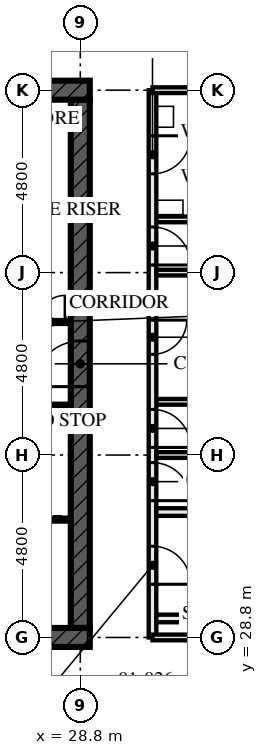
"""IFC4 building model, lengths in metres.
Left out: names, types, materials, properties, quantities, classifications, styles, units other than length and angle.
Written with IfcOpenShell. Run it as: python <this file> out.ifc"""

import sys

from ifc_helpers import new_model, si_unit, direction, frame, frame_2d, origin, place, context, subcontext, project, spatial, rectangle, extrude, element, fill, save


model = new_model("IFC4")
c1 = context("Model", 3, precision=1e-05, world=origin(), true_north=direction((0.0, 1.0)))
c2 = subcontext(c1, "Body", "Model", "MODEL_VIEW")
j1 = project(units=[si_unit("LENGTHUNIT", "METRE"), si_unit("PLANEANGLEUNIT", "RADIAN")], contexts=[c1])
p1 = place(None, origin())
s1 = spatial("IfcSite", under=j1, at=p1, CompositionType="ELEMENT")
p2 = place(p1, origin())
s2 = spatial("IfcBuilding", under=s1, at=p2, CompositionType="ELEMENT")
p3 = place(p2, frame((0.0, 0.0, 4.5)))
s3 = spatial("IfcBuildingStorey", under=s2, at=p3, CompositionType="ELEMENT", Elevation=4.5)
p4 = place(p3, frame((14.15, 28.8, -0.17), z_axis=(0.0, 0.0, 1.0), x_axis=(1.0, 0.0, 0.0)))
e1 = element("IfcWall", 1, at=p4, inside=s3, PredefinedType="SHEAR", context=c2, shape_type="SweptSolid", body=[
    extrude(rectangle(XDim=14.9, YDim=0.5, at=frame_2d((7.45, 0.0))), origin(), (0.0, 0.0, 1.0), 4.5),
])
p5 = place(p4, frame((6.85, 0.0, 0.17)))
e2 = element("IfcOpeningElement", 2, at=p5, cuts=e1, PredefinedType="OPENING", context=c2, shape_type="SweptSolid", body=[
    extrude(rectangle(XDim=1.2, YDim=2.1, at=frame_2d((0.6, 1.05))), frame((0.0, 0.26, 0.0), z_axis=(0.0, -1.0, 0.0), x_axis=(1.0, 0.0, 0.0)), (0.0, 0.0, 1.0), 0.521),
])
p6 = place(p3, frame((29.05, 43.2, -0.17), z_axis=(0.0, 0.0, 1.0), x_axis=(-1.0, 0.0, 0.0)))
e3 = element("IfcWall", 3, at=p6, inside=s3, PredefinedType="SHEAR", context=c2, shape_type="SweptSolid", body=[
    extrude(rectangle(XDim=14.9, YDim=0.5, at=frame_2d((7.45, 0.0))), origin(), (0.0, 0.0, 1.0), 4.5),
])
p7 = place(p6, frame((6.85, 0.0, 0.17)))
e4 = element("IfcOpeningElement", 4, at=p7, cuts=e3, PredefinedType="OPENING", context=c2, shape_type="SweptSolid", body=[
    extrude(rectangle(XDim=1.2, YDim=2.1, at=frame_2d((0.6, 1.05))), frame((0.0, 0.26, 0.0), z_axis=(0.0, -1.0, 0.0), x_axis=(1.0, 0.0, 0.0)), (0.0, 0.0, 1.0), 0.521),
])
p8 = place(p3, frame((28.8, 29.05, -0.17), z_axis=(0.0, 0.0, 1.0), x_axis=(0.0, 1.0, 0.0)))
e5 = element("IfcWall", 5, at=p8, inside=s3, PredefinedType="SHEAR", context=c2, shape_type="SweptSolid", body=[
    extrude(rectangle(XDim=13.9, YDim=0.5, at=frame_2d((6.95, 0.0))), origin(), (0.0, 0.0, 1.0), 4.5),
])
p9 = place(p8, frame((6.35, 0.0, 0.17)))
e6 = element("IfcOpeningElement", 6, at=p9, cuts=e5, PredefinedType="OPENING", context=c2, shape_type="SweptSolid", body=[
    extrude(rectangle(XDim=1.2, YDim=2.1, at=frame_2d((0.6, 1.05))), frame((0.0, 0.26, 0.0), z_axis=(0.0, -1.0, 0.0), x_axis=(1.0, 0.0, 0.0)), (0.0, 0.0, 1.0), 0.521),
])
for number, where, z_axis, x_axis in (
    (7, (35.5, 29.3, 0.0), (0.0, 0.0, 1.0), (-1.0, 0.0, 0.0)),
    (8, (35.5, 32.1, 0.0), (0.0, 0.0, 1.0), (-1.0, 0.0, 0.0)),
):
    element("IfcWall", number, at=place(p3, frame(where, z_axis=z_axis, x_axis=x_axis)), inside=s3, PredefinedType="SOLIDWALL", context=c2, shape_type="SweptSolid", body=[
        extrude(rectangle(XDim=4.7, YDim=0.2, at=frame_2d((2.35, 0.0))), origin(), (0.0, 0.0, 1.0), 3.99),
    ])
for number, where, z_axis, x_axis in (
    (9, (33.1, 35.0, 0.0), (0.0, 0.0, 1.0), (-1.0, 0.0, 0.0)),
    (10, (33.1, 39.8, 0.0), (0.0, 0.0, 1.0), (-1.0, 0.0, 0.0)),
):
    element("IfcWall", number, at=place(p3, frame(where, z_axis=z_axis, x_axis=x_axis)), inside=s3, PredefinedType="PARTITIONING", context=c2, shape_type="SweptSolid", body=[
        extrude(rectangle(XDim=2.3, YDim=0.15, at=frame_2d((1.15, 0.0))), origin(), (0.0, 0.0, 1.0), 4.33),
    ])
for number, where, z_axis, x_axis in (
    (11, (42.805, 33.6, 0.0), (0.0, 0.0, 1.0), (-1.0, 0.0, 0.0)),
    (12, (42.805, 38.4, 0.0), (0.0, 0.0, 1.0), (-1.0, 0.0, 0.0)),
):
    element("IfcWall", number, at=place(p3, frame(where, z_axis=z_axis, x_axis=x_axis)), inside=s3, PredefinedType="PARTITIONING", context=c2, shape_type="SweptSolid", body=[
        extrude(rectangle(XDim=12.005, YDim=0.15, at=frame_2d((6.002, 0.0))), origin(), (0.0, 0.0, 1.0), 3.55),
    ])
p10 = place(p3, frame((30.7, 28.8, 0.0), z_axis=(0.0, 0.0, 1.0), x_axis=(0.0, 1.0, 0.0)))
e13 = element("IfcWall", 13, at=p10, inside=s3, PredefinedType="PARTITIONING", context=c2, shape_type="SweptSolid", body=[
    extrude(rectangle(XDim=14.4, YDim=0.2, at=frame_2d((7.2, 0.0))), origin(), (0.0, 0.0, 1.0), 3.55),
])
p11 = place(p10, frame((1.4, 0.0, 0.0)))
e14 = element("IfcOpeningElement", 14, at=p11, cuts=e13, PredefinedType="OPENING", context=c2, shape_type="SweptSolid", body=[
    extrude(rectangle(XDim=1.0, YDim=2.1, at=frame_2d((0.5, 1.05))), frame((0.0, 0.111, 0.0), z_axis=(0.0, -1.0, 0.0), x_axis=(1.0, 0.0, 0.0)), (0.0, 0.0, 1.0), 0.221),
])
p12 = place(p10, frame((3.6, 0.0, 0.0)))
e15 = element("IfcOpeningElement", 15, at=p12, cuts=e13, PredefinedType="OPENING", context=c2, shape_type="SweptSolid", body=[
    extrude(rectangle(XDim=1.0, YDim=2.4, at=frame_2d((0.5, 1.2))), frame((0.0, 0.111, 0.0), z_axis=(0.0, -1.0, 0.0), x_axis=(1.0, 0.0, 0.0)), (0.0, 0.0, 1.0), 0.221),
])
p13 = place(p10, frame((5.0, 0.0, 0.0)))
e16 = element("IfcOpeningElement", 16, at=p13, cuts=e13, PredefinedType="OPENING", context=c2, shape_type="SweptSolid", body=[
    extrude(rectangle(XDim=1.0, YDim=2.4, at=frame_2d((0.5, 1.2))), frame((0.0, 0.111, 0.0), z_axis=(0.0, -1.0, 0.0), x_axis=(1.0, 0.0, 0.0)), (0.0, 0.0, 1.0), 0.221),
])
p14 = place(p10, frame((9.8, 0.0, 0.0)))
e17 = element("IfcOpeningElement", 17, at=p14, cuts=e13, PredefinedType="OPENING", context=c2, shape_type="SweptSolid", body=[
    extrude(rectangle(XDim=1.0, YDim=2.4, at=frame_2d((0.5, 1.2))), frame((0.0, 0.111, 0.0), z_axis=(0.0, -1.0, 0.0), x_axis=(1.0, 0.0, 0.0)), (0.0, 0.0, 1.0), 0.221),
])
p15 = place(p10, frame((7.45, 0.0, 0.0)))
e18 = element("IfcOpeningElement", 18, at=p15, cuts=e13, PredefinedType="OPENING", context=c2, shape_type="SweptSolid", body=[
    extrude(rectangle(XDim=0.9, YDim=2.1, at=frame_2d((0.45, 1.05))), frame((0.0, 0.111, 0.0), z_axis=(0.0, -1.0, 0.0), x_axis=(1.0, 0.0, 0.0)), (0.0, 0.0, 1.0), 0.221),
])
p16 = place(p10, frame((12.2, 0.0, 0.0)))
e19 = element("IfcOpeningElement", 19, at=p16, cuts=e13, PredefinedType="OPENING", context=c2, shape_type="SweptSolid", body=[
    extrude(rectangle(XDim=1.0, YDim=2.1, at=frame_2d((0.5, 1.05))), frame((0.0, 0.111, 0.0), z_axis=(0.0, -1.0, 0.0), x_axis=(1.0, 0.0, 0.0)), (0.0, 0.0, 1.0), 0.221),
])
p17 = place(p3, frame((23.05, 34.9, 0.0), z_axis=(0.0, 0.0, 1.0), x_axis=(1.0, 0.0, 0.0)))
e20 = element("IfcWall", 20, at=p17, inside=s3, PredefinedType="SOLIDWALL", context=c2, shape_type="SweptSolid", body=[
    extrude(rectangle(XDim=5.5, YDim=0.1, at=frame_2d((2.75, 0.0))), origin(), (0.0, 0.0, 1.0), 4.33),
])
p18 = place(p3, frame((22.65, 37.1, 0.0), z_axis=(0.0, 0.0, 1.0), x_axis=(1.0, 0.0, 0.0)))
e21 = element("IfcWall", 21, at=p18, inside=s3, PredefinedType="SOLIDWALL", context=c2, shape_type="SweptSolid", body=[
    extrude(rectangle(XDim=5.9, YDim=0.1, at=frame_2d((2.95, 0.0))), origin(), (0.0, 0.0, 1.0), 4.33),
])
p19 = place(p18, frame((3.5, 0.0, 0.0)))
e22 = element("IfcOpeningElement", 22, at=p19, cuts=e21, PredefinedType="OPENING", context=c2, shape_type="SweptSolid", body=[
    extrude(rectangle(XDim=0.9, YDim=2.1, at=frame_2d((0.45, 1.05))), frame((0.0, 0.061, 0.0), z_axis=(0.0, -1.0, 0.0), x_axis=(1.0, 0.0, 0.0)), (0.0, 0.0, 1.0), 0.121),
])
p20 = place(p18, frame((5.05, 0.0, 0.0)))
e23 = element("IfcOpeningElement", 23, at=p20, cuts=e21, PredefinedType="OPENING", context=c2, shape_type="SweptSolid", body=[
    extrude(rectangle(XDim=0.7, YDim=2.1, at=frame_2d((0.35, 1.05))), frame((0.0, 0.061, 0.0), z_axis=(0.0, -1.0, 0.0), x_axis=(1.0, 0.0, 0.0)), (0.0, 0.0, 1.0), 0.121),
])
p21 = place(p3, frame((23.15, 31.9, 0.0), z_axis=(0.0, 0.0, 1.0), x_axis=(1.0, 0.0, 0.0)))
e24 = element("IfcWall", 24, at=p21, inside=s3, PredefinedType="SOLIDWALL", context=c2, shape_type="SweptSolid", body=[
    extrude(rectangle(XDim=5.4, YDim=0.1, at=frame_2d((2.7, 0.0))), origin(), (0.0, 0.0, 1.0), 4.33),
])
for number, where, z_axis, x_axis in (
    (25, (33.205, 28.8, 0.0), (0.0, 0.0, 1.0), (-1.0, 0.0, 0.0)),
    (26, (33.205, 43.2, 0.0), (0.0, 0.0, 1.0), (-1.0, 0.0, 0.0)),
):
    element("IfcWall", number, at=place(p3, frame(where, z_axis=z_axis, x_axis=x_axis)), inside=s3, PredefinedType="PARTITIONING", context=c2, shape_type="SweptSolid", body=[
        extrude(rectangle(XDim=2.505, YDim=0.15, at=frame_2d((1.252, 0.0))), origin(), (0.0, 0.0, 1.0), 3.32),
    ])
p22 = place(p11, frame((1.0, 0.0, 0.0), z_axis=(0.0, 0.0, 1.0), x_axis=(-1.0, 0.0, 0.0)))
e27 = element("IfcDoor", 27, at=p22, inside=s3, OperationType="SINGLE_SWING_LEFT", PredefinedType="DOOR", context=c2, shape_type="SweptSolid", body=[
    extrude(rectangle(XDim=1.0, YDim=2.1, at=frame_2d((0.5, 1.05))), frame((0.0, 0.032, 0.0), z_axis=(0.0, -1.0, 0.0), x_axis=(1.0, 0.0, 0.0)), (0.0, 0.0, 1.0), 0.064),
])
fill(e14, e27)
p23 = place(p12, frame((1.0, 0.0, 0.0), z_axis=(0.0, 0.0, 1.0), x_axis=(-1.0, 0.0, 0.0)))
e28 = element("IfcDoor", 28, at=p23, inside=s3, OperationType="SINGLE_SWING_LEFT", PredefinedType="DOOR", context=c2, shape_type="SweptSolid", body=[
    extrude(rectangle(XDim=1.0, YDim=2.4, at=frame_2d((0.5, 1.2))), frame((0.0, 0.027, 0.0), z_axis=(0.0, -1.0, 0.0), x_axis=(1.0, 0.0, 0.0)), (0.0, 0.0, 1.0), 0.054),
])
fill(e15, e28)
p24 = place(p13, frame((1.0, 0.0, 0.0), z_axis=(0.0, 0.0, 1.0), x_axis=(-1.0, 0.0, 0.0)))
e29 = element("IfcDoor", 29, at=p24, inside=s3, OperationType="SINGLE_SWING_LEFT", PredefinedType="DOOR", context=c2, shape_type="SweptSolid", body=[
    extrude(rectangle(XDim=1.0, YDim=2.4, at=frame_2d((0.5, 1.2))), frame((0.0, 0.027, 0.0), z_axis=(0.0, -1.0, 0.0), x_axis=(1.0, 0.0, 0.0)), (0.0, 0.0, 1.0), 0.054),
])
fill(e16, e29)
p25 = place(p14, frame((1.0, 0.0, 0.0), z_axis=(0.0, 0.0, 1.0), x_axis=(-1.0, 0.0, 0.0)))
e30 = element("IfcDoor", 30, at=p25, inside=s3, OperationType="SINGLE_SWING_LEFT", PredefinedType="DOOR", context=c2, shape_type="SweptSolid", body=[
    extrude(rectangle(XDim=1.0, YDim=2.4, at=frame_2d((0.5, 1.2))), frame((0.0, 0.027, 0.0), z_axis=(0.0, -1.0, 0.0), x_axis=(1.0, 0.0, 0.0)), (0.0, 0.0, 1.0), 0.054),
])
fill(e17, e30)
p26 = place(p15, frame((0.9, 0.0, 0.0), z_axis=(0.0, 0.0, 1.0), x_axis=(-1.0, 0.0, 0.0)))
e31 = element("IfcDoor", 31, at=p26, inside=s3, OperationType="SINGLE_SWING_RIGHT", PredefinedType="DOOR", context=c2, shape_type="SweptSolid", body=[
    extrude(rectangle(XDim=0.9, YDim=2.1, at=frame_2d((0.45, 1.05))), frame((0.0, 0.027, 0.0), z_axis=(0.0, -1.0, 0.0), x_axis=(1.0, 0.0, 0.0)), (0.0, 0.0, 1.0), 0.054),
])
fill(e18, e31)
p27 = place(p16, frame((1.0, 0.0, 0.0), z_axis=(0.0, 0.0, 1.0), x_axis=(-1.0, 0.0, 0.0)))
e32 = element("IfcDoor", 32, at=p27, inside=s3, OperationType="SINGLE_SWING_RIGHT", PredefinedType="DOOR", context=c2, shape_type="SweptSolid", body=[
    extrude(rectangle(XDim=1.0, YDim=2.1, at=frame_2d((0.5, 1.05))), frame((0.0, 0.027, 0.0), z_axis=(0.0, -1.0, 0.0), x_axis=(1.0, 0.0, 0.0)), (0.0, 0.0, 1.0), 0.054),
])
fill(e19, e32)
p28 = place(p20, origin())
e33 = element("IfcDoor", 33, at=p28, inside=s3, OperationType="SINGLE_SWING_LEFT", PredefinedType="DOOR", context=c2, shape_type="SweptSolid", body=[
    extrude(rectangle(XDim=0.7, YDim=2.1, at=frame_2d((0.35, 1.05))), frame((0.0, 0.027, 0.0), z_axis=(0.0, -1.0, 0.0), x_axis=(1.0, 0.0, 0.0)), (0.0, 0.0, 1.0), 0.054),
])
fill(e23, e33)
p29 = place(p9, origin())
e34 = element("IfcDoor", 34, at=p29, inside=s3, OperationType="SINGLE_SWING_LEFT", PredefinedType="DOOR", context=c2, shape_type="SweptSolid", body=[
    extrude(rectangle(XDim=1.2, YDim=2.1, at=frame_2d((0.6, 1.05))), frame((0.0, 0.027, 0.0), z_axis=(0.0, -1.0, 0.0), x_axis=(1.0, 0.0, 0.0)), (0.0, 0.0, 1.0), 0.054),
])
fill(e6, e34)
save(model, sys.argv[1])
